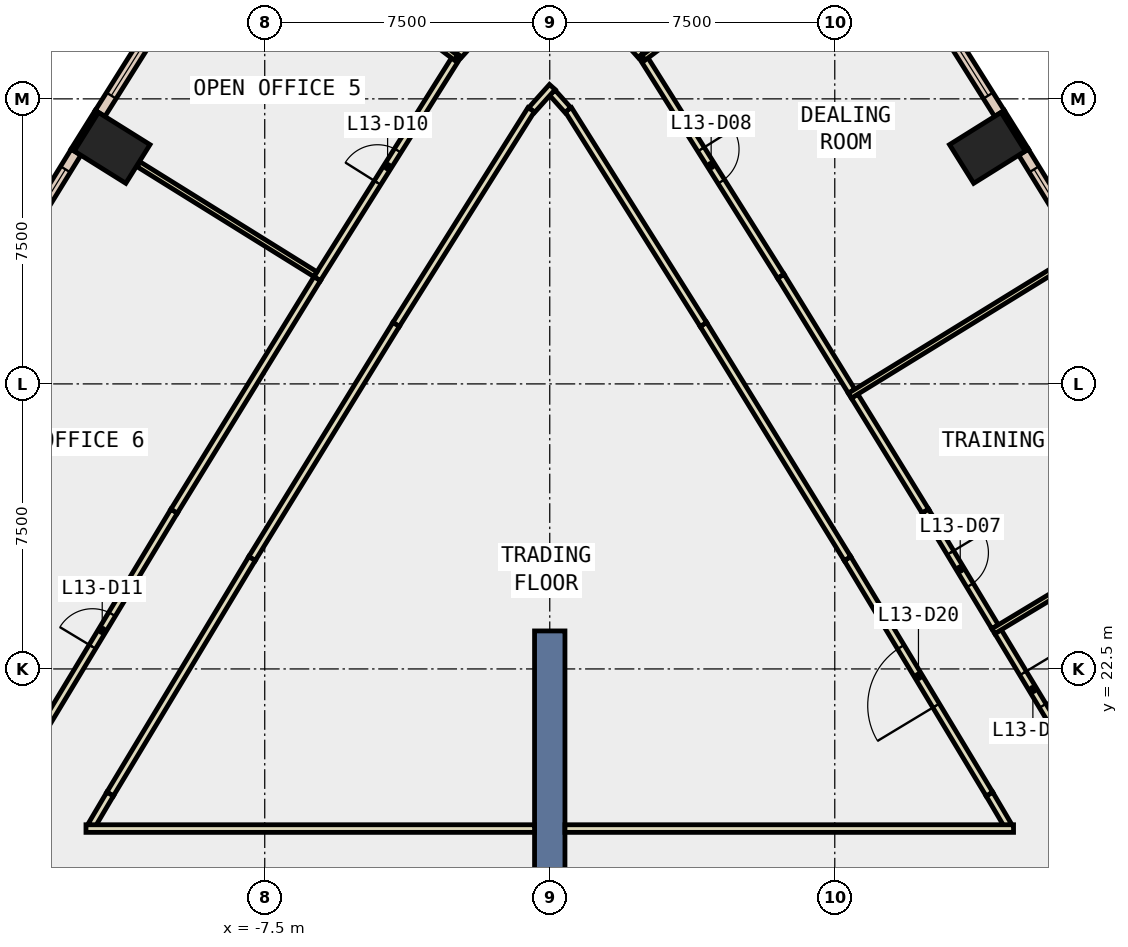
"""IFC4 building model, lengths in metres.
Left out: names, types, materials, properties, quantities, classifications, styles, units other than length and angle.
Written with IfcOpenShell. Run it as: python <this file> out.ifc"""

import sys

from ifc_helpers import new_model, si_unit, direction, frame, frame_2d, origin, origin_2d, place, context, subcontext, project, spatial, rectangle, extrude, element, fill, save


model = new_model("IFC4")
c1 = context("Model", 3, precision=1e-05, world=origin(), true_north=direction((0.0, 1.0)))
c2 = subcontext(c1, "Body", "Model", "MODEL_VIEW")
j1 = project(units=[si_unit("LENGTHUNIT", "METRE"), si_unit("PLANEANGLEUNIT", "RADIAN")], contexts=[c1])
p1 = place(None, origin())
s1 = spatial("IfcSite", under=j1, at=p1, CompositionType="ELEMENT")
p2 = place(p1, origin())
s2 = spatial("IfcBuilding", under=s1, at=p2, CompositionType="ELEMENT")
p3 = place(p2, frame((0.0, 0.0, 64.4)))
s3 = spatial("IfcBuildingStorey", under=s2, at=p3, CompositionType="ELEMENT", Elevation=64.4)
for number, where, z_axis, x_axis in (
    (1, (11.516, 36.211, -0.4), (0.0, 0.0, 1.0), (-0.53, 0.848, 0.0)),
    (2, (-11.516, 36.211, -0.4), (0.0, 0.0, 1.0), (0.53, 0.848, 0.0)),
):
    element("IfcColumn", number, at=place(p3, frame(where, z_axis=z_axis, x_axis=x_axis)), inside=s3, PredefinedType="COLUMN", context=c2, shape_type="SweptSolid", body=[
        extrude(rectangle(XDim=1.2, YDim=1.6, at=origin_2d()), origin(), (0.0, 0.0, 1.0), 4.2),
    ])
p4 = place(p3, frame((0.0, 14.5, -0.4), z_axis=(0.0, 0.0, 1.0), x_axis=(0.0, 1.0, 0.0)))
e3 = element("IfcWall", 3, at=p4, inside=s3, PredefinedType="SHEAR", context=c2, shape_type="SweptSolid", body=[
    extrude(rectangle(XDim=9.0, YDim=0.8, at=frame_2d((4.5, 0.0))), origin(), (0.0, 0.0, 1.0), 4.2),
])
for number, where, z_axis, x_axis in (
    (4, (12.555, 36.153, 0.0), (0.0, 0.0, 1.0), (-0.53, 0.848, 0.0)),
    (5, (-11.919, 37.17, 0.0), (0.0, 0.0, 1.0), (-0.53, -0.848, 0.0)),
):
    element("IfcWall", number, at=place(p3, frame(where, z_axis=z_axis, x_axis=x_axis)), inside=s3, PredefinedType="STANDARD", context=c2, shape_type="SweptSolid", body=[
        extrude(rectangle(XDim=1.199, YDim=0.1, at=frame_2d((0.6, 0.0))), origin(), (0.0, 0.0, 1.0), 3.8),
    ])
p5 = place(p3, frame((15.677, 30.882, 0.0), z_axis=(0.0, 0.0, 1.0), x_axis=(-0.524239751329, 0.851570715282, 0.0)))
e6 = element("IfcWall", 6, at=p5, inside=s3, PredefinedType="STANDARD", context=c2, shape_type="SweptSolid", body=[
    extrude(rectangle(XDim=6.125, YDim=0.3, at=frame_2d((3.062, 0.0))), origin(), (0.0, 0.0, 1.0), 3.8),
])
p6 = place(p5, frame((0.531, 0.0, 0.9)))
e7 = element("IfcOpeningElement", 7, at=p6, cuts=e6, PredefinedType="OPENING", context=c2, shape_type="SweptSolid", body=[
    extrude(rectangle(XDim=2.0, YDim=2.6, at=frame_2d((1.0, 1.3))), frame((0.0, 0.16, 0.0), z_axis=(0.0, -1.0, 0.0), x_axis=(1.0, 0.0, 0.0)), (0.0, 0.0, 1.0), 0.32),
])
p7 = place(p5, frame((3.594, 0.0, 0.9)))
e8 = element("IfcOpeningElement", 8, at=p7, cuts=e6, PredefinedType="OPENING", context=c2, shape_type="SweptSolid", body=[
    extrude(rectangle(XDim=2.0, YDim=2.6, at=frame_2d((1.0, 1.3))), frame((0.0, 0.16, 0.0), z_axis=(0.0, -1.0, 0.0), x_axis=(1.0, 0.0, 0.0)), (0.0, 0.0, 1.0), 0.32),
])
p8 = place(p3, frame((11.833, 37.116, 0.0), z_axis=(0.0, 0.0, 1.0), x_axis=(-0.532322705893, 0.846541515102, 0.0)))
e9 = element("IfcWall", 9, at=p8, inside=s3, PredefinedType="STANDARD", context=c2, shape_type="SweptSolid", body=[
    extrude(rectangle(XDim=6.218, YDim=0.3, at=frame_2d((3.109, 0.0))), origin(), (0.0, 0.0, 1.0), 3.8),
])
p9 = place(p8, frame((0.555, 0.0, 0.9)))
e10 = element("IfcOpeningElement", 10, at=p9, cuts=e9, PredefinedType="OPENING", context=c2, shape_type="SweptSolid", body=[
    extrude(rectangle(XDim=2.0, YDim=2.6, at=frame_2d((1.0, 1.3))), frame((0.0, 0.16, 0.0), z_axis=(0.0, -1.0, 0.0), x_axis=(1.0, 0.0, 0.0)), (0.0, 0.0, 1.0), 0.32),
])
p10 = place(p8, frame((3.664, 0.0, 0.9)))
e11 = element("IfcOpeningElement", 11, at=p10, cuts=e9, PredefinedType="OPENING", context=c2, shape_type="SweptSolid", body=[
    extrude(rectangle(XDim=2.0, YDim=2.6, at=frame_2d((1.0, 1.3))), frame((0.0, 0.16, 0.0), z_axis=(0.0, -1.0, 0.0), x_axis=(1.0, 0.0, 0.0)), (0.0, 0.0, 1.0), 0.32),
])
p11 = place(p3, frame((-8.523, 42.38, 0.0), z_axis=(0.0, 0.0, 1.0), x_axis=(-0.532322705893, -0.846541515102, 0.0)))
e12 = element("IfcWall", 12, at=p11, inside=s3, PredefinedType="STANDARD", context=c2, shape_type="SweptSolid", body=[
    extrude(rectangle(XDim=6.218, YDim=0.3, at=frame_2d((3.109, 0.0))), origin(), (0.0, 0.0, 1.0), 3.8),
])
p12 = place(p11, frame((0.555, 0.0, 0.9)))
e13 = element("IfcOpeningElement", 13, at=p12, cuts=e12, PredefinedType="OPENING", context=c2, shape_type="SweptSolid", body=[
    extrude(rectangle(XDim=2.0, YDim=2.6, at=frame_2d((1.0, 1.3))), frame((0.0, 0.16, 0.0), z_axis=(0.0, -1.0, 0.0), x_axis=(1.0, 0.0, 0.0)), (0.0, 0.0, 1.0), 0.32),
])
p13 = place(p11, frame((3.664, 0.0, 0.9)))
e14 = element("IfcOpeningElement", 14, at=p13, cuts=e12, PredefinedType="OPENING", context=c2, shape_type="SweptSolid", body=[
    extrude(rectangle(XDim=2.0, YDim=2.6, at=frame_2d((1.0, 1.3))), frame((0.0, 0.16, 0.0), z_axis=(0.0, -1.0, 0.0), x_axis=(1.0, 0.0, 0.0)), (0.0, 0.0, 1.0), 0.32),
])
p14 = place(p3, frame((-12.466, 36.098, 0.0), z_axis=(0.0, 0.0, 1.0), x_axis=(-0.524239751329, -0.851570715282, 0.0)))
e15 = element("IfcWall", 15, at=p14, inside=s3, PredefinedType="STANDARD", context=c2, shape_type="SweptSolid", body=[
    extrude(rectangle(XDim=6.125, YDim=0.3, at=frame_2d((3.062, 0.0))), origin(), (0.0, 0.0, 1.0), 3.8),
])
p15 = place(p14, frame((0.531, 0.0, 0.9)))
e16 = element("IfcOpeningElement", 16, at=p15, cuts=e15, PredefinedType="OPENING", context=c2, shape_type="SweptSolid", body=[
    extrude(rectangle(XDim=2.0, YDim=2.6, at=frame_2d((1.0, 1.3))), frame((0.0, 0.16, 0.0), z_axis=(0.0, -1.0, 0.0), x_axis=(1.0, 0.0, 0.0)), (0.0, 0.0, 1.0), 0.32),
])
p16 = place(p14, frame((3.594, 0.0, 0.9)))
e17 = element("IfcOpeningElement", 17, at=p16, cuts=e15, PredefinedType="OPENING", context=c2, shape_type="SweptSolid", body=[
    extrude(rectangle(XDim=2.0, YDim=2.6, at=frame_2d((1.0, 1.3))), frame((0.0, 0.16, 0.0), z_axis=(0.0, -1.0, 0.0), x_axis=(1.0, 0.0, 0.0)), (0.0, 0.0, 1.0), 0.32),
])
p17 = place(p3, frame((12.054, 18.386, 0.0), z_axis=(0.0, 0.0, 1.0), x_axis=(-0.508048285953, 0.861328589529, 0.0)))
e18 = element("IfcWall", 18, at=p17, inside=s3, PredefinedType="PARTITIONING", context=c2, shape_type="SweptSolid", body=[
    extrude(rectangle(XDim=0.954, YDim=0.2, at=frame_2d((0.477, 0.0))), origin(), (0.0, 0.0, 1.0), 3.8),
])
p18 = place(p3, frame((11.569, 19.208, 0.0), z_axis=(0.0, 0.0, 1.0), x_axis=(-0.516172233954, 0.85648480716, 0.0)))
e19 = element("IfcWall", 19, at=p18, inside=s3, PredefinedType="PARTITIONING", context=c2, shape_type="SweptSolid", body=[
    extrude(rectangle(XDim=7.234, YDim=0.2, at=frame_2d((3.617, 0.0))), origin(), (0.0, 0.0, 1.0), 3.8),
])
p19 = place(p18, frame((2.717, 0.0, 0.0)))
e20 = element("IfcOpeningElement", 20, at=p19, cuts=e19, PredefinedType="OPENING", context=c2, shape_type="SweptSolid", body=[
    extrude(rectangle(XDim=1.8, YDim=2.1, at=frame_2d((0.9, 1.05))), frame((0.0, 0.11, 0.0), z_axis=(0.0, -1.0, 0.0), x_axis=(1.0, 0.0, 0.0)), (0.0, 0.0, 1.0), 0.22),
])
p20 = place(p3, frame((7.835, 25.404, 0.0), z_axis=(0.0, 0.0, 1.0), x_axis=(-0.524225471951, 0.851579505717, 0.0)))
e21 = element("IfcWall", 21, at=p20, inside=s3, PredefinedType="PARTITIONING", context=c2, shape_type="SweptSolid", body=[
    extrude(rectangle(XDim=7.233, YDim=0.2, at=frame_2d((3.617, 0.0))), origin(), (0.0, 0.0, 1.0), 3.8),
])
p21 = place(p3, frame((4.043, 31.564, 0.0), z_axis=(0.0, 0.0, 1.0), x_axis=(-0.532301094997, 0.846555104092, 0.0)))
e22 = element("IfcWall", 22, at=p21, inside=s3, PredefinedType="PARTITIONING", context=c2, shape_type="SweptSolid", body=[
    extrude(rectangle(XDim=6.677, YDim=0.2, at=frame_2d((3.338, 0.0))), origin(), (0.0, 0.0, 1.0), 3.8),
])
p22 = place(p3, frame((0.476, 37.206, 0.0), z_axis=(0.0, 0.0, 1.0), x_axis=(-0.667027496744, 0.745033098988, 0.0)))
e23 = element("IfcWall", 23, at=p22, inside=s3, PredefinedType="PARTITIONING", context=c2, shape_type="SweptSolid", body=[
    extrude(rectangle(XDim=0.614, YDim=0.2, at=frame_2d((0.307, 0.0))), origin(), (0.0, 0.0, 1.0), 3.8),
])
p23 = place(p3, frame((0.067, 37.812, 0.0), z_axis=(0.0, 0.0, 1.0), x_axis=(-0.667338487106, -0.744754552606, 0.0)))
e24 = element("IfcWall", 24, at=p23, inside=s3, PredefinedType="PARTITIONING", context=c2, shape_type="SweptSolid", body=[
    extrude(rectangle(XDim=0.814, YDim=0.2, at=frame_2d((0.407, 0.0))), origin(), (0.0, 0.0, 1.0), 3.8),
])
p24 = place(p3, frame((-0.489, 37.216, 0.0), z_axis=(0.0, 0.0, 1.0), x_axis=(-0.532301094997, -0.846555104092, 0.0)))
e25 = element("IfcWall", 25, at=p24, inside=s3, PredefinedType="PARTITIONING", context=c2, shape_type="SweptSolid", body=[
    extrude(rectangle(XDim=6.677, YDim=0.2, at=frame_2d((3.338, 0.0))), origin(), (0.0, 0.0, 1.0), 3.8),
])
p25 = place(p3, frame((-4.043, 31.564, 0.0), z_axis=(0.0, 0.0, 1.0), x_axis=(-0.524225471951, -0.851579505717, 0.0)))
e26 = element("IfcWall", 26, at=p25, inside=s3, PredefinedType="PARTITIONING", context=c2, shape_type="SweptSolid", body=[
    extrude(rectangle(XDim=7.233, YDim=0.2, at=frame_2d((3.617, 0.0))), origin(), (0.0, 0.0, 1.0), 3.8),
])
p26 = place(p3, frame((-7.835, 25.404, 0.0), z_axis=(0.0, 0.0, 1.0), x_axis=(-0.516172233954, -0.85648480716, 0.0)))
e27 = element("IfcWall", 27, at=p26, inside=s3, PredefinedType="PARTITIONING", context=c2, shape_type="SweptSolid", body=[
    extrude(rectangle(XDim=7.234, YDim=0.2, at=frame_2d((3.617, 0.0))), origin(), (0.0, 0.0, 1.0), 3.8),
])
p27 = place(p3, frame((-11.569, 19.208, 0.0), z_axis=(0.0, 0.0, 1.0), x_axis=(-0.508048285953, -0.861328589529, 0.0)))
e28 = element("IfcWall", 28, at=p27, inside=s3, PredefinedType="PARTITIONING", context=c2, shape_type="SweptSolid", body=[
    extrude(rectangle(XDim=0.954, YDim=0.2, at=frame_2d((0.477, 0.0))), origin(), (0.0, 0.0, 1.0), 3.8),
])
p28 = place(p3, frame((11.796, 23.481, 0.0), z_axis=(0.0, 0.0, 1.0), x_axis=(0.516070934647, -0.8565458484, 0.0)))
e29 = element("IfcWall", 29, at=p28, inside=s3, PredefinedType="PARTITIONING", context=c2, shape_type="SweptSolid", body=[
    extrude(rectangle(XDim=3.554, YDim=0.2, at=frame_2d((1.777, 0.0))), origin(), (0.0, 0.0, 1.0), 3.8),
])
p29 = place(p28, frame((1.277, 0.0, 0.0)))
e30 = element("IfcOpeningElement", 30, at=p29, cuts=e29, PredefinedType="OPENING", context=c2, shape_type="SweptSolid", body=[
    extrude(rectangle(XDim=1.0, YDim=2.1, at=frame_2d((0.5, 1.05))), frame((0.0, 0.11, 0.0), z_axis=(0.0, -1.0, 0.0), x_axis=(1.0, 0.0, 0.0)), (0.0, 0.0, 1.0), 0.22),
])
p30 = place(p3, frame((8.022, 29.678, 0.0), z_axis=(0.0, 0.0, 1.0), x_axis=(0.524093591744, -0.851660676029, 0.0)))
e31 = element("IfcWall", 31, at=p30, inside=s3, PredefinedType="PARTITIONING", context=c2, shape_type="SweptSolid", body=[
    extrude(rectangle(XDim=3.553, YDim=0.2, at=frame_2d((1.776, 0.0))), origin(), (0.0, 0.0, 1.0), 3.8),
])
p31 = place(p3, frame((9.884, 26.652, 0.0), z_axis=(0.0, 0.0, 1.0), x_axis=(0.516162051318, -0.856490943781, 0.0)))
e32 = element("IfcWall", 32, at=p31, inside=s3, PredefinedType="PARTITIONING", context=c2, shape_type="SweptSolid", body=[
    extrude(rectangle(XDim=3.553, YDim=0.2, at=frame_2d((1.777, 0.0))), origin(), (0.0, 0.0, 1.0), 3.8),
])
p32 = place(p31, frame((1.277, 0.0, 0.0)))
e33 = element("IfcOpeningElement", 33, at=p32, cuts=e32, PredefinedType="OPENING", context=c2, shape_type="SweptSolid", body=[
    extrude(rectangle(XDim=1.0, YDim=2.1, at=frame_2d((0.5, 1.05))), frame((0.0, 0.11, 0.0), z_axis=(0.0, -1.0, 0.0), x_axis=(1.0, 0.0, 0.0)), (0.0, 0.0, 1.0), 0.22),
])
p33 = place(p3, frame((2.413, 38.665, 0.0), z_axis=(0.0, 0.0, 1.0), x_axis=(0.532328273879, -0.846538013812, 0.0)))
e34 = element("IfcWall", 34, at=p33, inside=s3, PredefinedType="PARTITIONING", context=c2, shape_type="SweptSolid", body=[
    extrude(rectangle(XDim=6.89, YDim=0.2, at=frame_2d((3.445, 0.0))), origin(), (0.0, 0.0, 1.0), 3.8),
])
p34 = place(p33, frame((2.945, 0.0, 0.0)))
e35 = element("IfcOpeningElement", 35, at=p34, cuts=e34, PredefinedType="OPENING", context=c2, shape_type="SweptSolid", body=[
    extrude(rectangle(XDim=1.0, YDim=2.1, at=frame_2d((0.5, 1.05))), frame((0.0, 0.11, 0.0), z_axis=(0.0, -1.0, 0.0), x_axis=(1.0, 0.0, 0.0)), (0.0, 0.0, 1.0), 0.22),
])
p35 = place(p3, frame((6.081, 32.832, 0.0), z_axis=(0.0, 0.0, 1.0), x_axis=(0.524062922014, -0.851679548756, 0.0)))
e36 = element("IfcWall", 36, at=p35, inside=s3, PredefinedType="PARTITIONING", context=c2, shape_type="SweptSolid", body=[
    extrude(rectangle(XDim=3.553, YDim=0.2, at=frame_2d((1.777, 0.0))), origin(), (0.0, 0.0, 1.0), 3.8),
])
p36 = place(p3, frame((-2.4, 38.655, 0.0), z_axis=(0.0, 0.0, 1.0), x_axis=(0.666791730919, 0.745244112743, 0.0)))
e37 = element("IfcWall", 37, at=p36, inside=s3, PredefinedType="PARTITIONING", context=c2, shape_type="SweptSolid", body=[
    extrude(rectangle(XDim=2.281, YDim=0.2, at=frame_2d((1.141, 0.0))), origin(), (0.0, 0.0, 1.0), 3.8),
])
p37 = place(p36, frame((0.641, 0.0, 0.0)))
e38 = element("IfcOpeningElement", 38, at=p37, cuts=e37, PredefinedType="OPENING", context=c2, shape_type="SweptSolid", body=[
    extrude(rectangle(XDim=1.0, YDim=2.1, at=frame_2d((0.5, 1.05))), frame((0.0, 0.11, 0.0), z_axis=(0.0, -1.0, 0.0), x_axis=(1.0, 0.0, 0.0)), (0.0, 0.0, 1.0), 0.22),
])
p38 = place(p3, frame((0.879, 40.355, 0.0), z_axis=(0.0, 0.0, 1.0), x_axis=(0.666791730919, -0.745244112743, 0.0)))
e39 = element("IfcWall", 39, at=p38, inside=s3, PredefinedType="PARTITIONING", context=c2, shape_type="SweptSolid", body=[
    extrude(rectangle(XDim=2.281, YDim=0.2, at=frame_2d((1.141, 0.0))), origin(), (0.0, 0.0, 1.0), 3.8),
])
p39 = place(p3, frame((-6.121, 32.768, 0.0), z_axis=(0.0, 0.0, 1.0), x_axis=(0.532309351336, 0.846549912574, 0.0)))
e40 = element("IfcWall", 40, at=p39, inside=s3, PredefinedType="PARTITIONING", context=c2, shape_type="SweptSolid", body=[
    extrude(rectangle(XDim=6.966, YDim=0.2, at=frame_2d((3.483, 0.0))), origin(), (0.0, 0.0, 1.0), 3.8),
])
p40 = place(p39, frame((2.983, 0.0, 0.0)))
e41 = element("IfcOpeningElement", 41, at=p40, cuts=e40, PredefinedType="OPENING", context=c2, shape_type="SweptSolid", body=[
    extrude(rectangle(XDim=1.0, YDim=2.1, at=frame_2d((0.5, 1.05))), frame((0.0, 0.11, 0.0), z_axis=(0.0, -1.0, 0.0), x_axis=(1.0, 0.0, 0.0)), (0.0, 0.0, 1.0), 0.22),
])
p41 = place(p3, frame((-13.669, 20.373, 0.0), z_axis=(0.0, 0.0, 1.0), x_axis=(0.516247820136, 0.85643924957, 0.0)))
e42 = element("IfcWall", 42, at=p41, inside=s3, PredefinedType="PARTITIONING", context=c2, shape_type="SweptSolid", body=[
    extrude(rectangle(XDim=7.332, YDim=0.2, at=frame_2d((3.666, 0.0))), origin(), (0.0, 0.0, 1.0), 3.8),
])
p42 = place(p41, frame((3.166, 0.0, 0.0)))
e43 = element("IfcOpeningElement", 43, at=p42, cuts=e42, PredefinedType="OPENING", context=c2, shape_type="SweptSolid", body=[
    extrude(rectangle(XDim=1.0, YDim=2.1, at=frame_2d((0.5, 1.05))), frame((0.0, 0.11, 0.0), z_axis=(0.0, -1.0, 0.0), x_axis=(1.0, 0.0, 0.0)), (0.0, 0.0, 1.0), 0.22),
])
p43 = place(p3, frame((-9.884, 26.652, 0.0), z_axis=(0.0, 0.0, 1.0), x_axis=(0.524182788618, 0.851605779758, 0.0)))
e44 = element("IfcWall", 44, at=p43, inside=s3, PredefinedType="PARTITIONING", context=c2, shape_type="SweptSolid", body=[
    extrude(rectangle(XDim=7.18, YDim=0.2, at=frame_2d((3.59, 0.0))), origin(), (0.0, 0.0, 1.0), 3.8),
])
p44 = place(p3, frame((-12.204, 18.3, 0.0), z_axis=(0.0, 0.0, 1.0), x_axis=(1.0, 0.0, 0.0)))
e45 = element("IfcWall", 45, at=p44, inside=s3, PredefinedType="PARTITIONING", context=c2, shape_type="SweptSolid", body=[
    extrude(rectangle(XDim=11.804, YDim=0.2, at=frame_2d((5.902, 0.0))), origin(), (0.0, 0.0, 1.0), 3.8),
])
p45 = place(p3, frame((11.672, 23.493, 0.0), z_axis=(0.0, 0.0, 1.0), x_axis=(0.856462653555, 0.516208991656, 0.0)))
e46 = element("IfcWall", 46, at=p45, inside=s3, PredefinedType="PARTITIONING", context=c2, shape_type="SweptSolid", body=[
    extrude(rectangle(XDim=7.1, YDim=0.15, at=frame_2d((3.55, 0.0))), origin(), (0.0, 0.0, 1.0), 3.8),
])
p46 = place(p3, frame((7.897, 29.69, 0.0), z_axis=(0.0, 0.0, 1.0), x_axis=(0.851604009471, 0.524185664677, 0.0)))
e47 = element("IfcWall", 47, at=p46, inside=s3, PredefinedType="PARTITIONING", context=c2, shape_type="SweptSolid", body=[
    extrude(rectangle(XDim=7.101, YDim=0.15, at=frame_2d((3.55, 0.0))), origin(), (0.0, 0.0, 1.0), 3.8),
])
for number, where, z_axis, x_axis in (
    (48, (2.466, 38.58, 0.0), (0.0, 0.0, 1.0), (0.799, 0.602, 0.0)),
    (49, (-2.466, 38.58, 0.0), (0.0, 0.0, 1.0), (-0.799, 0.602, 0.0)),
):
    element("IfcWall", number, at=place(p3, frame(where, z_axis=z_axis, x_axis=x_axis)), inside=s3, PredefinedType="PARTITIONING", context=c2, shape_type="SweptSolid", body=[
        extrude(rectangle(XDim=5.605, YDim=0.15, at=frame_2d((2.802, 0.0))), origin(), (0.0, 0.0, 1.0), 3.8),
    ])
p47 = place(p3, frame((-6.166, 32.885, 0.0), z_axis=(0.0, 0.0, 1.0), x_axis=(-0.84915518202, 0.528143424506, 0.0)))
e50 = element("IfcWall", 50, at=p47, inside=s3, PredefinedType="PARTITIONING", context=c2, shape_type="SweptSolid", body=[
    extrude(rectangle(XDim=5.48, YDim=0.15, at=frame_2d((2.74, 0.0))), origin(), (0.0, 0.0, 1.0), 3.8),
])
p48 = place(p3, frame((0.4, 18.3, 0.0), z_axis=(0.0, 0.0, 1.0), x_axis=(1.0, 0.0, 0.0)))
e51 = element("IfcWall", 51, at=p48, inside=s3, PredefinedType="PARTITIONING", context=c2, shape_type="SweptSolid", body=[
    extrude(rectangle(XDim=11.804, YDim=0.2, at=frame_2d((5.902, 0.0))), origin(), (0.0, 0.0, 1.0), 3.8),
])
p49 = place(p7, origin())
e52 = element("IfcWindow", 52, at=p49, inside=s3, PartitioningType="SINGLE_PANEL", PredefinedType="WINDOW", context=c2, shape_type="SweptSolid", body=[
    extrude(rectangle(XDim=2.0, YDim=2.6, at=frame_2d((1.0, 1.3))), frame((0.0, 0.03, 0.0), z_axis=(0.0, -1.0, 0.0), x_axis=(1.0, 0.0, 0.0)), (0.0, 0.0, 1.0), 0.06),
])
fill(e8, e52)
p50 = place(p9, origin())
e53 = element("IfcWindow", 53, at=p50, inside=s3, PartitioningType="SINGLE_PANEL", PredefinedType="WINDOW", context=c2, shape_type="SweptSolid", body=[
    extrude(rectangle(XDim=2.0, YDim=2.6, at=frame_2d((1.0, 1.3))), frame((0.0, 0.03, 0.0), z_axis=(0.0, -1.0, 0.0), x_axis=(1.0, 0.0, 0.0)), (0.0, 0.0, 1.0), 0.06),
])
fill(e10, e53)
p51 = place(p13, origin())
e54 = element("IfcWindow", 54, at=p51, inside=s3, PartitioningType="SINGLE_PANEL", PredefinedType="WINDOW", context=c2, shape_type="SweptSolid", body=[
    extrude(rectangle(XDim=2.0, YDim=2.6, at=frame_2d((1.0, 1.3))), frame((0.0, 0.03, 0.0), z_axis=(0.0, -1.0, 0.0), x_axis=(1.0, 0.0, 0.0)), (0.0, 0.0, 1.0), 0.06),
])
fill(e14, e54)
p52 = place(p15, origin())
e55 = element("IfcWindow", 55, at=p52, inside=s3, PartitioningType="SINGLE_PANEL", PredefinedType="WINDOW", context=c2, shape_type="SweptSolid", body=[
    extrude(rectangle(XDim=2.0, YDim=2.6, at=frame_2d((1.0, 1.3))), frame((0.0, 0.03, 0.0), z_axis=(0.0, -1.0, 0.0), x_axis=(1.0, 0.0, 0.0)), (0.0, 0.0, 1.0), 0.06),
])
fill(e16, e55)
p53 = place(p29, origin())
e56 = element("IfcDoor", 56, at=p53, inside=s3, OperationType="SINGLE_SWING_LEFT", PredefinedType="DOOR", context=c2, shape_type="SweptSolid", body=[
    extrude(rectangle(XDim=1.0, YDim=2.1, at=frame_2d((0.5, 1.05))), frame((0.0, 0.025, 0.0), z_axis=(0.0, -1.0, 0.0), x_axis=(1.0, 0.0, 0.0)), (0.0, 0.0, 1.0), 0.05),
])
fill(e30, e56)
p54 = place(p32, origin())
e57 = element("IfcDoor", 57, at=p54, inside=s3, OperationType="SINGLE_SWING_LEFT", PredefinedType="DOOR", context=c2, shape_type="SweptSolid", body=[
    extrude(rectangle(XDim=1.0, YDim=2.1, at=frame_2d((0.5, 1.05))), frame((0.0, 0.025, 0.0), z_axis=(0.0, -1.0, 0.0), x_axis=(1.0, 0.0, 0.0)), (0.0, 0.0, 1.0), 0.05),
])
fill(e33, e57)
p55 = place(p34, origin())
e58 = element("IfcDoor", 58, at=p55, inside=s3, OperationType="SINGLE_SWING_LEFT", PredefinedType="DOOR", context=c2, shape_type="SweptSolid", body=[
    extrude(rectangle(XDim=1.0, YDim=2.1, at=frame_2d((0.5, 1.05))), frame((0.0, 0.025, 0.0), z_axis=(0.0, -1.0, 0.0), x_axis=(1.0, 0.0, 0.0)), (0.0, 0.0, 1.0), 0.05),
])
fill(e35, e58)
p56 = place(p40, origin())
e59 = element("IfcDoor", 59, at=p56, inside=s3, OperationType="SINGLE_SWING_LEFT", PredefinedType="DOOR", context=c2, shape_type="SweptSolid", body=[
    extrude(rectangle(XDim=1.0, YDim=2.1, at=frame_2d((0.5, 1.05))), frame((0.0, 0.025, 0.0), z_axis=(0.0, -1.0, 0.0), x_axis=(1.0, 0.0, 0.0)), (0.0, 0.0, 1.0), 0.05),
])
fill(e41, e59)
p57 = place(p42, origin())
e60 = element("IfcDoor", 60, at=p57, inside=s3, OperationType="SINGLE_SWING_LEFT", PredefinedType="DOOR", context=c2, shape_type="SweptSolid", body=[
    extrude(rectangle(XDim=1.0, YDim=2.1, at=frame_2d((0.5, 1.05))), frame((0.0, 0.025, 0.0), z_axis=(0.0, -1.0, 0.0), x_axis=(1.0, 0.0, 0.0)), (0.0, 0.0, 1.0), 0.05),
])
fill(e43, e60)
p58 = place(p19, origin())
e61 = element("IfcDoor", 61, at=p58, inside=s3, OperationType="DOUBLE_DOOR_SINGLE_SWING", PredefinedType="DOOR", context=c2, shape_type="SweptSolid", body=[
    extrude(rectangle(XDim=1.8, YDim=2.1, at=frame_2d((0.9, 1.05))), frame((0.0, 0.025, 0.0), z_axis=(0.0, -1.0, 0.0), x_axis=(1.0, 0.0, 0.0)), (0.0, 0.0, 1.0), 0.05),
])
fill(e20, e61)
save(model, sys.argv[1])
